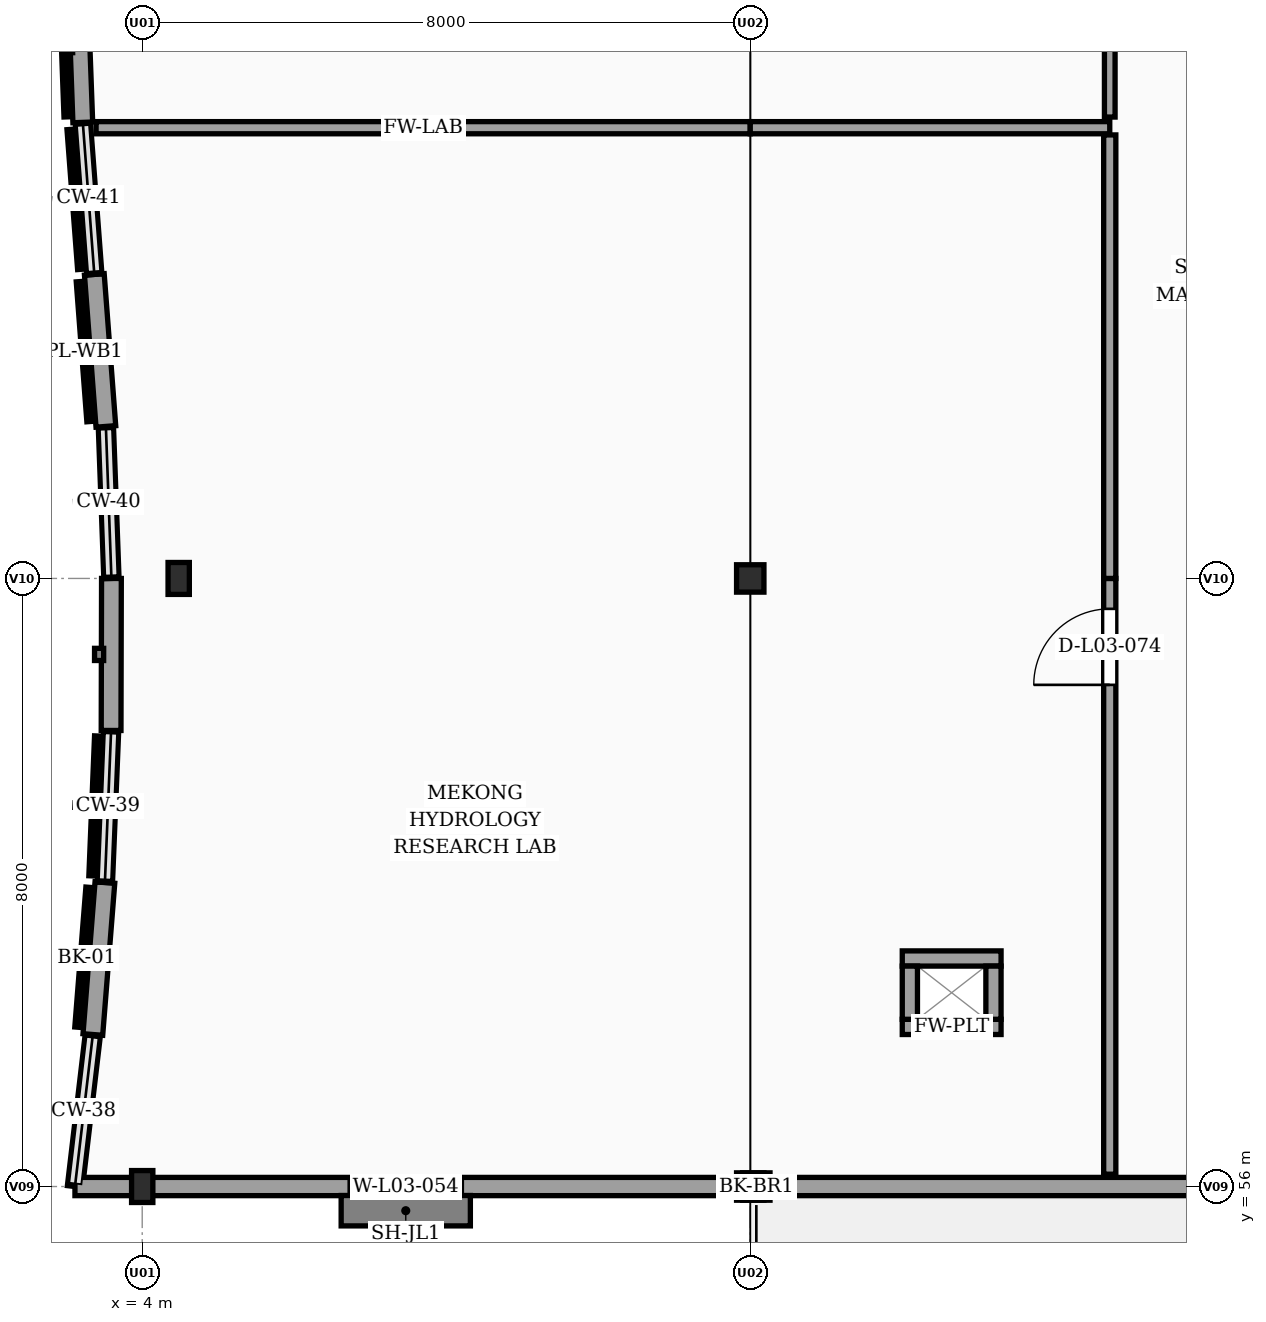
"""IFC4 building model, lengths in metres.
Left out: names, types, materials, properties, quantities, classifications, styles, units other than length and angle.
Written with IfcOpenShell. Run it as: python <this file> out.ifc"""

import sys

from ifc_helpers import new_model, si_unit, direction, frame, frame_2d, origin, origin_2d, place, context, subcontext, project, spatial, rectangle, extrude, element, fill, save


model = new_model("IFC4")
c1 = context("Model", 3, precision=1e-05, world=origin(), true_north=direction((0.0, 1.0)))
c2 = subcontext(c1, "Body", "Model", "MODEL_VIEW")
j1 = project(units=[si_unit("LENGTHUNIT", "METRE"), si_unit("PLANEANGLEUNIT", "RADIAN")], contexts=[c1])
p1 = place(None, origin())
s1 = spatial("IfcSite", under=j1, at=p1, CompositionType="ELEMENT")
p2 = place(p1, origin())
s2 = spatial("IfcBuilding", under=s1, at=p2, CompositionType="ELEMENT")
p3 = place(p2, frame((0.0, 0.0, 12.3)))
s3 = spatial("IfcBuildingStorey", under=s2, at=p3, CompositionType="ELEMENT", Elevation=12.3)
p4 = place(p3, frame((4.0, 56.0, 0.0), z_axis=(0.0, 0.0, 1.0), x_axis=(1.0, 0.0, 0.0)))
e1 = element("IfcColumn", 1, at=p4, inside=s3, PredefinedType="PILASTER", context=c2, shape_type="SweptSolid", body=[
    extrude(rectangle(XDim=0.28, YDim=0.42, at=origin_2d()), origin(), (0.0, 0.0, 1.0), 6.66),
])
p5 = place(p3, frame((4.48, 64.0, 0.0), z_axis=(0.0, 0.0, 1.0), x_axis=(1.0, 0.0, 0.0)))
e2 = element("IfcColumn", 2, at=p5, inside=s3, PredefinedType="PILASTER", context=c2, shape_type="SweptSolid", body=[
    extrude(rectangle(XDim=0.28, YDim=0.42, at=origin_2d()), origin(), (0.0, 0.0, 1.0), 6.11),
])
p6 = place(p3, frame((12.0, 56.0, 0.0), z_axis=(0.0, 0.0, 1.0), x_axis=(1.0, 0.0, 0.0)))
e3 = element("IfcColumn", 3, at=p6, inside=s3, PredefinedType="COLUMN", context=c2, shape_type="SweptSolid", body=[
    extrude(rectangle(XDim=0.36, YDim=0.36, at=origin_2d()), origin(), (0.0, 0.0, 1.0), 6.318),
])
p7 = place(p3, frame((12.0, 64.0, 0.0), z_axis=(0.0, 0.0, 1.0), x_axis=(1.0, 0.0, 0.0)))
e4 = element("IfcColumn", 4, at=p7, inside=s3, PredefinedType="COLUMN", context=c2, shape_type="SweptSolid", body=[
    extrude(rectangle(XDim=0.36, YDim=0.36, at=origin_2d()), origin(), (0.0, 0.0, 1.0), 5.789),
])
p8 = place(p3, frame((3.115, 56.0, 0.0), z_axis=(0.0, 0.0, 1.0), x_axis=(0.116988959085, 0.99313321536, 0.0)))
e5 = element("IfcWall", 5, at=p8, inside=s3, PredefinedType="SOLIDWALL", context=c2, shape_type="SweptSolid", body=[
    extrude(rectangle(XDim=2.014, YDim=0.2, at=frame_2d((1.007, 0.0))), origin(), (0.0, 0.0, 1.0), 0.95),
])
p9 = place(p3, frame((3.351, 58.0, 0.0), z_axis=(0.0, 0.0, 1.0), x_axis=(0.078976178075, 0.996876503533, 0.0)))
e6 = element("IfcWall", 6, at=p9, inside=s3, PredefinedType="SOLIDWALL", context=c2, shape_type="SweptSolid", body=[
    extrude(rectangle(XDim=2.006, YDim=0.26, at=frame_2d((1.003, 0.0))), origin(), (0.0, 0.0, 1.0), 6.416),
])
p10 = place(p3, frame((3.509, 60.0, 0.0), z_axis=(0.0, 0.0, 1.0), x_axis=(0.040737639062, 0.99916987783, 0.0)))
e7 = element("IfcWall", 7, at=p10, inside=s3, PredefinedType="SOLIDWALL", context=c2, shape_type="SweptSolid", body=[
    extrude(rectangle(XDim=2.002, YDim=0.2, at=frame_2d((1.001, 0.0))), origin(), (0.0, 0.0, 1.0), 0.95),
])
p11 = place(p3, frame((3.591, 62.0, 0.0), z_axis=(0.0, 0.0, 1.0), x_axis=(0.002197260321, 0.999997586021, 0.0)))
e8 = element("IfcWall", 8, at=p11, inside=s3, PredefinedType="SOLIDWALL", context=c2, shape_type="SweptSolid", body=[
    extrude(rectangle(XDim=2.0, YDim=0.26, at=frame_2d((1.0, 0.0))), origin(), (0.0, 0.0, 1.0), 6.147),
])
p12 = place(p3, frame((3.595, 64.0, 0.0), z_axis=(0.0, 0.0, 1.0), x_axis=(-0.036596562065, 0.999330121454, 0.0)))
e9 = element("IfcWall", 9, at=p12, inside=s3, PredefinedType="SOLIDWALL", context=c2, shape_type="SweptSolid", body=[
    extrude(rectangle(XDim=2.001, YDim=0.2, at=frame_2d((1.0, 0.0))), origin(), (0.0, 0.0, 1.0), 0.95),
])
p13 = place(p3, frame((3.522, 66.0, 0.0), z_axis=(0.0, 0.0, 1.0), x_axis=(-0.075588789742, 0.997139074987, 0.0)))
e10 = element("IfcWall", 10, at=p13, inside=s3, PredefinedType="SOLIDWALL", context=c2, shape_type="SweptSolid", body=[
    extrude(rectangle(XDim=2.006, YDim=0.26, at=frame_2d((1.003, 0.0))), origin(), (0.0, 0.0, 1.0), 5.892),
])
p14 = place(p3, frame((3.37, 68.0, 0.0), z_axis=(0.0, 0.0, 1.0), x_axis=(-0.075709813676, 0.9971298933, 0.0)))
e11 = element("IfcWall", 11, at=p14, inside=s3, PredefinedType="SOLIDWALL", context=c2, shape_type="SweptSolid", body=[
    extrude(rectangle(XDim=2.006, YDim=0.2, at=frame_2d((1.003, 0.0))), origin(), (0.0, 0.0, 1.0), 0.95),
])
p15 = place(p3, frame((3.218, 70.0, 0.0), z_axis=(0.0, 0.0, 1.0), x_axis=(-0.036596562065, 0.999330121454, 0.0)))
e12 = element("IfcWall", 12, at=p15, inside=s3, PredefinedType="SOLIDWALL", context=c2, shape_type="SweptSolid", body=[
    extrude(rectangle(XDim=2.001, YDim=0.26, at=frame_2d((1.0, 0.0))), origin(), (0.0, 0.0, 1.0), 5.637),
])
p16 = place(p3, frame((19.82, 56.0, 0.0), z_axis=(0.0, 0.0, 1.0), x_axis=(-1.0, 0.0, 0.0)))
e13 = element("IfcWall", 13, at=p16, inside=s3, PredefinedType="SOLIDWALL", context=c2, shape_type="SweptSolid", body=[
    extrude(rectangle(XDim=7.64, YDim=0.24, at=frame_2d((3.82, 0.0))), origin(), (0.0, 0.0, 1.0), 5.395),
])
p17 = place(p3, frame((11.82, 56.0, 0.0), z_axis=(0.0, 0.0, 1.0), x_axis=(-1.0, 0.0, 0.0)))
e14 = element("IfcWall", 14, at=p17, inside=s3, PredefinedType="SOLIDWALL", context=c2, shape_type="SweptSolid", body=[
    extrude(rectangle(XDim=8.705, YDim=0.24, at=frame_2d((4.353, 0.0))), origin(), (0.0, 0.0, 1.0), 5.736),
])
p18 = place(p17, frame((3.603, 0.0, 0.95)))
e15 = element("IfcOpeningElement", 15, at=p18, cuts=e14, PredefinedType="OPENING", context=c2, shape_type="SweptSolid", body=[
    extrude(rectangle(XDim=1.5, YDim=1.2, at=frame_2d((0.75, 0.6))), frame((0.0, 0.13, 0.0), z_axis=(0.0, -1.0, 0.0), x_axis=(1.0, 0.0, 0.0)), (0.0, 0.0, 1.0), 0.26),
])
for number, where, z_axis, x_axis in (
    (16, (15.3, 58.1, 0.0), (0.0, 0.0, 1.0), (-1.0, 0.0, 0.0)),
    (17, (14.0, 59.0, 0.0), (0.0, 0.0, 1.0), (1.0, 0.0, 0.0)),
):
    element("IfcWall", number, at=place(p3, frame(where, z_axis=z_axis, x_axis=x_axis)), inside=s3, PredefinedType="PARTITIONING", context=c2, shape_type="SweptSolid", body=[
        extrude(rectangle(XDim=1.3, YDim=0.2, at=frame_2d((0.65, 0.0))), origin(), (0.0, 0.0, 1.0), 3.65),
    ])
for number, where, z_axis, x_axis in (
    (18, (14.1, 58.2, 0.0), (0.0, 0.0, 1.0), (0.0, 1.0, 0.0)),
    (19, (15.2, 58.9, 0.0), (0.0, 0.0, 1.0), (0.0, -1.0, 0.0)),
):
    element("IfcWall", number, at=place(p3, frame(where, z_axis=z_axis, x_axis=x_axis)), inside=s3, PredefinedType="PARTITIONING", context=c2, shape_type="SweptSolid", body=[
        extrude(rectangle(XDim=0.7, YDim=0.2, at=frame_2d((0.35, 0.0))), origin(), (0.0, 0.0, 1.0), 3.65),
    ])
p19 = place(p3, frame((3.393, 69.93, 0.0), z_axis=(0.0, 0.0, 1.0), x_axis=(1.0, 0.0, 0.0)))
e20 = element("IfcWall", 20, at=p19, inside=s3, PredefinedType="PARTITIONING", context=c2, shape_type="SweptSolid", body=[
    extrude(rectangle(XDim=8.607, YDim=0.16, at=frame_2d((4.304, 0.0))), origin(), (0.0, 0.0, 1.0), 3.65),
])
p20 = place(p3, frame((12.0, 69.93, 0.0), z_axis=(0.0, 0.0, 1.0), x_axis=(1.0, 0.0, 0.0)))
e21 = element("IfcWall", 21, at=p20, inside=s3, PredefinedType="PARTITIONING", context=c2, shape_type="SweptSolid", body=[
    extrude(rectangle(XDim=4.73, YDim=0.16, at=frame_2d((2.365, 0.0))), origin(), (0.0, 0.0, 1.0), 3.65),
])
p21 = place(p3, frame((16.73, 56.162, 0.0), z_axis=(0.0, 0.0, 1.0), x_axis=(0.0, 1.0, 0.0)))
e22 = element("IfcWall", 22, at=p21, inside=s3, PredefinedType="PARTITIONING", context=c2, shape_type="SweptSolid", body=[
    extrude(rectangle(XDim=7.838, YDim=0.16, at=frame_2d((3.919, 0.0))), origin(), (0.0, 0.0, 1.0), 3.65),
])
p22 = place(p21, frame((6.438, 0.0, 0.0)))
e23 = element("IfcOpeningElement", 23, at=p22, cuts=e22, PredefinedType="OPENING", context=c2, shape_type="SweptSolid", body=[
    extrude(rectangle(XDim=1.0, YDim=2.15, at=frame_2d((0.5, 1.075))), frame((0.0, 0.09, 0.0), z_axis=(0.0, -1.0, 0.0), x_axis=(1.0, 0.0, 0.0)), (0.0, 0.0, 1.0), 0.18),
])
p23 = place(p3, frame((16.73, 64.0, 0.0), z_axis=(0.0, 0.0, 1.0), x_axis=(0.0, 1.0, 0.0)))
e24 = element("IfcWall", 24, at=p23, inside=s3, PredefinedType="PARTITIONING", context=c2, shape_type="SweptSolid", body=[
    extrude(rectangle(XDim=5.835, YDim=0.16, at=frame_2d((2.917, 0.0))), origin(), (0.0, 0.0, 1.0), 3.65),
])
p24 = place(p3, frame((16.73, 70.07, 0.0), z_axis=(0.0, 0.0, 1.0), x_axis=(0.0, 1.0, 0.0)))
e25 = element("IfcWall", 25, at=p24, inside=s3, PredefinedType="PARTITIONING", context=c2, shape_type="SweptSolid", body=[
    extrude(rectangle(XDim=1.93, YDim=0.14, at=frame_2d((0.965, 0.0))), origin(), (0.0, 0.0, 1.0), 3.65),
])
p25 = place(p18, origin())
e26 = element("IfcWindow", 26, at=p25, inside=s3, PartitioningType="SINGLE_PANEL", PredefinedType="WINDOW", context=c2, shape_type="SweptSolid", body=[
    extrude(rectangle(XDim=1.5, YDim=1.2, at=frame_2d((0.75, 0.6))), frame((0.0, 0.03, 0.0), z_axis=(0.0, -1.0, 0.0), x_axis=(1.0, 0.0, 0.0)), (0.0, 0.0, 1.0), 0.06),
])
fill(e15, e26)
p26 = place(p22, origin())
e27 = element("IfcDoor", 27, at=p26, inside=s3, OperationType="SINGLE_SWING_LEFT", PredefinedType="DOOR", context=c2, shape_type="SweptSolid", body=[
    extrude(rectangle(XDim=1.0, YDim=2.15, at=frame_2d((0.5, 1.075))), frame((0.0, 0.025, 0.0), z_axis=(0.0, -1.0, 0.0), x_axis=(1.0, 0.0, 0.0)), (0.0, 0.0, 1.0), 0.05),
])
fill(e23, e27)
save(model, sys.argv[1])
